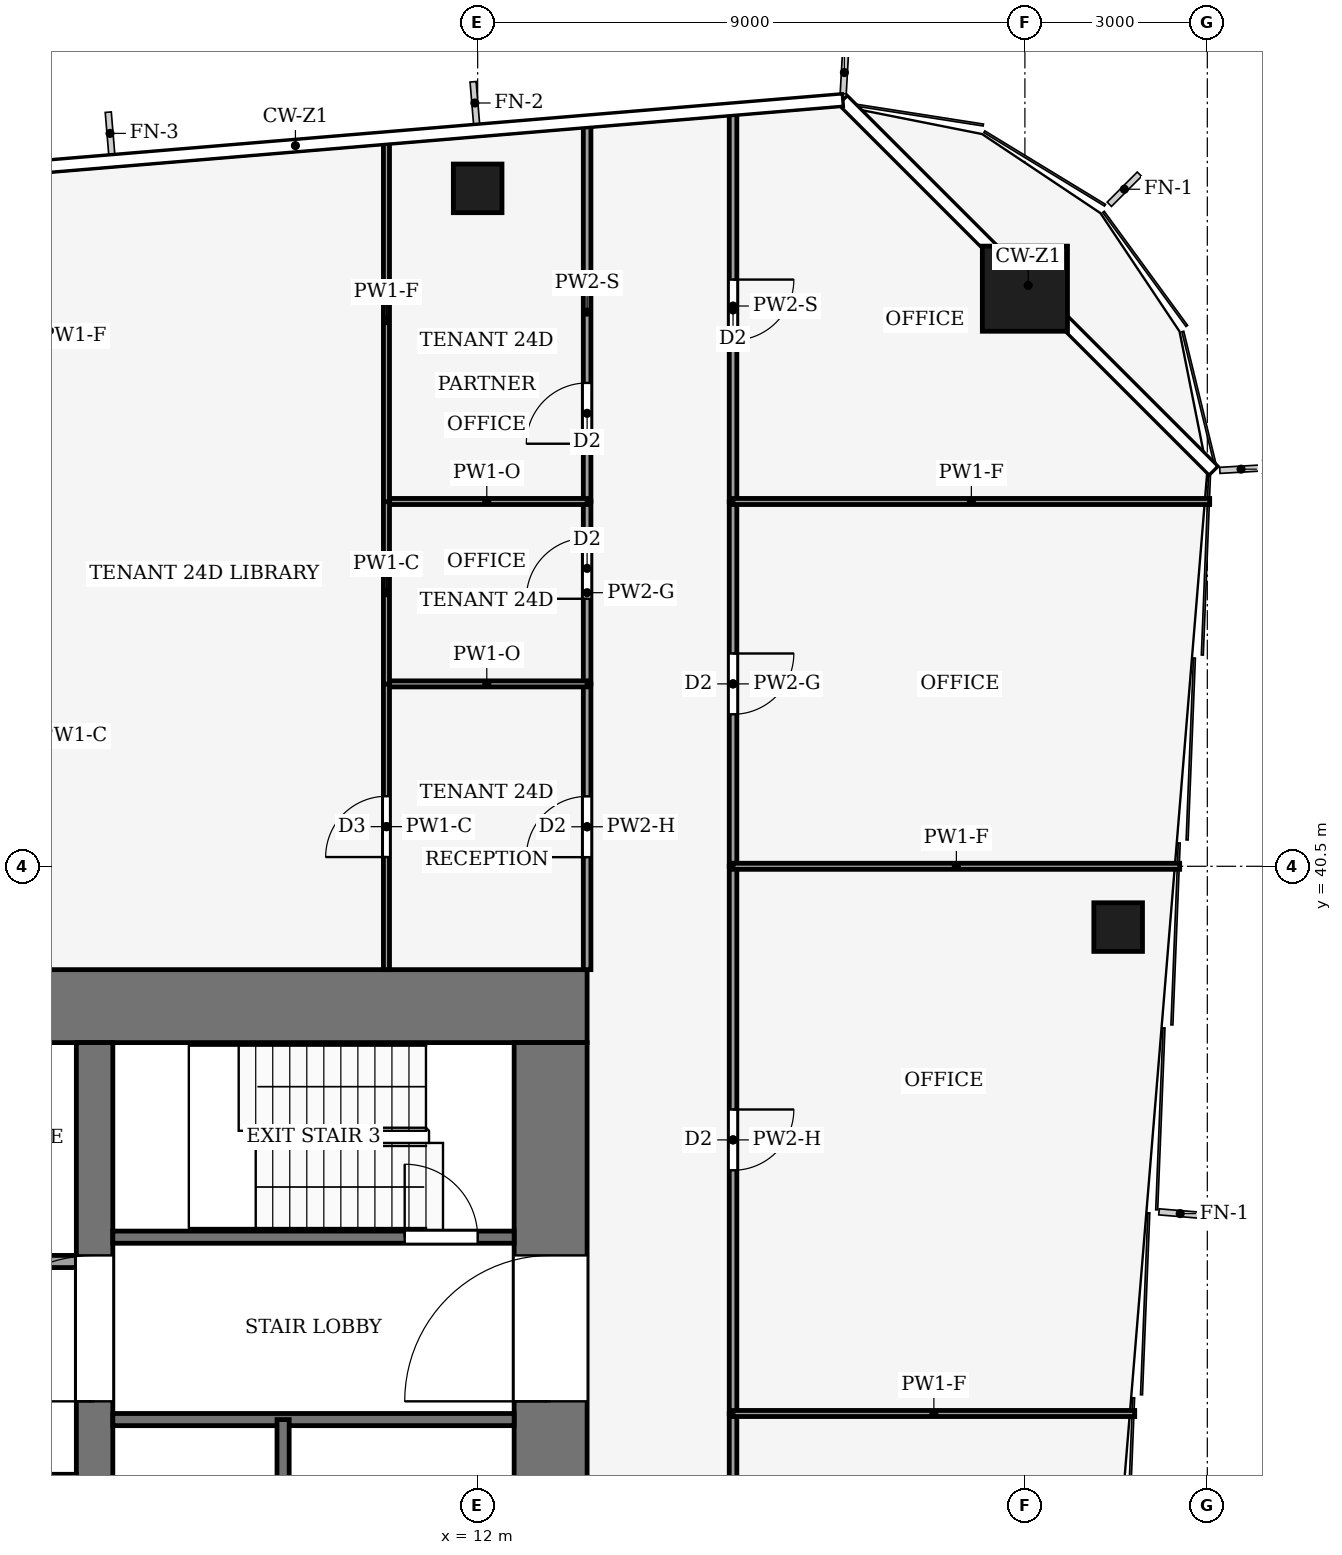
"""IFC4 building model, lengths in metres.
Left out: names, types, materials, properties, quantities, classifications, styles, units other than length and angle.
Written with IfcOpenShell. Run it as: python <this file> out.ifc"""

import sys

from ifc_helpers import new_model, si_unit, direction, frame, frame_2d, origin, origin_2d, place, context, subcontext, project, spatial, rectangle, hollow_rectangle, extrude, element, fill, save


model = new_model("IFC4")
c1 = context("Model", 3, precision=1e-05, world=origin(), true_north=direction((0.0, 1.0)))
c2 = subcontext(c1, "Body", "Model", "MODEL_VIEW")
j1 = project(units=[si_unit("LENGTHUNIT", "METRE"), si_unit("PLANEANGLEUNIT", "RADIAN")], contexts=[c1])
p1 = place(None, origin())
s1 = spatial("IfcSite", under=j1, at=p1, CompositionType="ELEMENT")
p2 = place(p1, origin())
s2 = spatial("IfcBuilding", under=s1, at=p2, CompositionType="ELEMENT")
p3 = place(p2, frame((0.0, 0.0, 106.0)))
s3 = spatial("IfcBuildingStorey", under=s2, at=p3, CompositionType="ELEMENT", Elevation=106.0)
p4 = place(p3, frame((-13.8, 38.2, -0.13), z_axis=(0.0, 0.0, 1.0), x_axis=(1.0, 0.0, 0.0)))
e1 = element("IfcWall", 1, at=p4, inside=s3, PredefinedType="SHEAR", context=c2, shape_type="SweptSolid", body=[
    extrude(rectangle(XDim=27.6, YDim=1.2, at=frame_2d((13.8, 0.0))), origin(), (0.0, 0.0, 1.0), 4.0),
])
p5 = place(p3, frame((13.2, 18.4, -0.13), z_axis=(0.0, 0.0, 1.0), x_axis=(0.0, 1.0, 0.0)))
e2 = element("IfcWall", 2, at=p5, inside=s3, PredefinedType="SHEAR", context=c2, shape_type="SweptSolid", body=[
    extrude(rectangle(XDim=19.2, YDim=1.2, at=frame_2d((9.6, 0.0))), origin(), (0.0, 0.0, 1.0), 4.0),
])
p6 = place(p5, frame((2.8, 0.0, 0.13)))
e3 = element("IfcOpeningElement", 3, at=p6, cuts=e2, PredefinedType="OPENING", context=c2, shape_type="SweptSolid", body=[
    extrude(rectangle(XDim=2.4, YDim=2.4, at=frame_2d((1.2, 1.2))), frame((0.0, 0.61, 0.0), z_axis=(0.0, -1.0, 0.0), x_axis=(1.0, 0.0, 0.0)), (0.0, 0.0, 1.0), 1.22),
])
p7 = place(p5, frame((13.3, 0.0, 0.13)))
e4 = element("IfcOpeningElement", 4, at=p7, cuts=e2, PredefinedType="OPENING", context=c2, shape_type="SweptSolid", body=[
    extrude(rectangle(XDim=2.4, YDim=2.4, at=frame_2d((1.2, 1.2))), frame((0.0, 0.61, 0.0), z_axis=(0.0, -1.0, 0.0), x_axis=(1.0, 0.0, 0.0)), (0.0, 0.0, 1.0), 1.22),
])
p8 = place(p3, frame((5.7, 18.4, -0.13), z_axis=(0.0, 0.0, 1.0), x_axis=(0.0, 1.0, 0.0)))
e5 = element("IfcWall", 5, at=p8, inside=s3, PredefinedType="SHEAR", context=c2, shape_type="SweptSolid", body=[
    extrude(rectangle(XDim=19.2, YDim=0.6, at=frame_2d((9.6, 0.0))), origin(), (0.0, 0.0, 1.0), 4.0),
])
p9 = place(p8, frame((8.35, 0.0, 0.13)))
e6 = element("IfcOpeningElement", 6, at=p9, cuts=e5, PredefinedType="OPENING", context=c2, shape_type="SweptSolid", body=[
    extrude(rectangle(XDim=0.9, YDim=2.1, at=frame_2d((0.45, 1.05))), frame((0.0, 0.31, 0.0), z_axis=(0.0, -1.0, 0.0), x_axis=(1.0, 0.0, 0.0)), (0.0, 0.0, 1.0), 0.62),
])
p10 = place(p8, frame((13.3, 0.0, 0.13)))
e7 = element("IfcOpeningElement", 7, at=p10, cuts=e5, PredefinedType="OPENING", context=c2, shape_type="SweptSolid", body=[
    extrude(rectangle(XDim=2.4, YDim=2.4, at=frame_2d((1.2, 1.2))), frame((0.0, 0.31, 0.0), z_axis=(0.0, -1.0, 0.0), x_axis=(1.0, 0.0, 0.0)), (0.0, 0.0, 1.0), 0.62),
])
p11 = place(p3, frame((21.0, 50.0, 0.0), z_axis=(0.0, 0.0, 1.0), x_axis=(1.0, 0.0, 0.0)))
e8 = element("IfcColumn", 8, at=p11, inside=s3, PredefinedType="COLUMN", context=c2, shape_type="SweptSolid", body=[
    extrude(hollow_rectangle(XDim=1.4, YDim=1.4, WallThickness=0.08, at=origin_2d()), origin(), (0.0, 0.0, 1.0), 4.0),
])
for number, where, z_axis, x_axis in (
    (9, (12.0, 51.65, 0.0), (0.0, 0.0, 1.0), (1.0, 0.0, 0.0)),
    (10, (22.534, 39.5, 0.0), (0.0, 0.0, 1.0), (1.0, 0.0, 0.0)),
):
    element("IfcColumn", number, at=place(p3, frame(where, z_axis=z_axis, x_axis=x_axis)), inside=s3, PredefinedType="COLUMN", context=c2, shape_type="SweptSolid", body=[
        extrude(hollow_rectangle(XDim=0.8, YDim=0.8, WallThickness=0.04, at=origin_2d()), origin(), (0.0, 0.0, 1.0), 4.0),
    ])
p12 = place(p3, frame((6.0, 31.4, 0.0), z_axis=(0.0, 0.0, 1.0), x_axis=(1.0, 0.0, 0.0)))
e11 = element("IfcWall", 11, at=p12, inside=s3, PredefinedType="PARTITIONING", context=c2, shape_type="SweptSolid", body=[
    extrude(rectangle(XDim=6.6, YDim=0.2, at=frame_2d((3.3, 0.0))), origin(), (0.0, 0.0, 1.0), 3.87),
])
p13 = place(p3, frame((-5.4, 34.0, 0.0), z_axis=(0.0, 0.0, 1.0), x_axis=(1.0, 0.0, 0.0)))
e12 = element("IfcWall", 12, at=p13, inside=s3, PredefinedType="PARTITIONING", context=c2, shape_type="SweptSolid", body=[
    extrude(rectangle(XDim=10.8, YDim=0.2, at=frame_2d((5.4, 0.0))), origin(), (0.0, 0.0, 1.0), 3.87),
])
p14 = place(p13, frame((6.15, 0.0, 0.0)))
e13 = element("IfcOpeningElement", 13, at=p14, cuts=e12, PredefinedType="OPENING", context=c2, shape_type="SweptSolid", body=[
    extrude(rectangle(XDim=1.2, YDim=2.2, at=frame_2d((0.6, 1.1))), frame((0.0, 0.11, 0.0), z_axis=(0.0, -1.0, 0.0), x_axis=(1.0, 0.0, 0.0)), (0.0, 0.0, 1.0), 0.22),
])
p15 = place(p13, frame((8.95, 0.0, 0.0)))
e14 = element("IfcOpeningElement", 14, at=p15, cuts=e12, PredefinedType="OPENING", context=c2, shape_type="SweptSolid", body=[
    extrude(rectangle(XDim=1.0, YDim=2.1, at=frame_2d((0.5, 1.05))), frame((0.0, 0.11, 0.0), z_axis=(0.0, -1.0, 0.0), x_axis=(1.0, 0.0, 0.0)), (0.0, 0.0, 1.0), 0.22),
])
p16 = place(p3, frame((6.0, 34.4, 0.0), z_axis=(0.0, 0.0, 1.0), x_axis=(1.0, 0.0, 0.0)))
e15 = element("IfcWall", 15, at=p16, inside=s3, PredefinedType="PARTITIONING", context=c2, shape_type="SweptSolid", body=[
    extrude(rectangle(XDim=6.6, YDim=0.2, at=frame_2d((3.3, 0.0))), origin(), (0.0, 0.0, 1.0), 3.87),
])
p17 = place(p16, frame((4.8, 0.0, 0.0)))
e16 = element("IfcOpeningElement", 16, at=p17, cuts=e15, PredefinedType="OPENING", context=c2, shape_type="SweptSolid", body=[
    extrude(rectangle(XDim=1.2, YDim=2.2, at=frame_2d((0.6, 1.1))), frame((0.0, 0.11, 0.0), z_axis=(0.0, -1.0, 0.0), x_axis=(1.0, 0.0, 0.0)), (0.0, 0.0, 1.0), 0.22),
])
p18 = place(p3, frame((8.8, 24.0, 0.0), z_axis=(0.0, 0.0, 1.0), x_axis=(0.0, 1.0, 0.0)))
e17 = element("IfcWall", 17, at=p18, inside=s3, PredefinedType="PARTITIONING", context=c2, shape_type="SweptSolid", body=[
    extrude(rectangle(XDim=7.4, YDim=0.2, at=frame_2d((3.7, 0.0))), origin(), (0.0, 0.0, 1.0), 3.87),
])
p19 = place(p3, frame((16.2, 31.5, 0.0), z_axis=(0.0, 0.0, 1.0), x_axis=(0.0, -1.0, 0.0)))
e18 = element("IfcWall", 18, at=p19, inside=s3, PredefinedType="PARTITIONING", context=c2, shape_type="SweptSolid", body=[
    extrude(rectangle(XDim=9.0, YDim=0.125, at=frame_2d((4.5, 0.0))), origin(), (0.0, 0.0, 1.0), 3.48),
])
p20 = place(p19, frame((4.0, 0.0, 0.0)))
e19 = element("IfcOpeningElement", 19, at=p20, cuts=e18, PredefinedType="OPENING", context=c2, shape_type="SweptSolid", body=[
    extrude(rectangle(XDim=1.0, YDim=2.1, at=frame_2d((0.5, 1.05))), frame((0.0, 0.073, 0.0), z_axis=(0.0, -1.0, 0.0), x_axis=(1.0, 0.0, 0.0)), (0.0, 0.0, 1.0), 0.145),
])
p21 = place(p3, frame((16.2, 40.5, 0.0), z_axis=(0.0, 0.0, 1.0), x_axis=(0.0, -1.0, 0.0)))
e20 = element("IfcWall", 20, at=p21, inside=s3, PredefinedType="PARTITIONING", context=c2, shape_type="SweptSolid", body=[
    extrude(rectangle(XDim=9.0, YDim=0.125, at=frame_2d((4.5, 0.0))), origin(), (0.0, 0.0, 1.0), 3.14),
])
p22 = place(p21, frame((4.0, 0.0, 0.0)))
e21 = element("IfcOpeningElement", 21, at=p22, cuts=e20, PredefinedType="OPENING", context=c2, shape_type="SweptSolid", body=[
    extrude(rectangle(XDim=1.0, YDim=2.1, at=frame_2d((0.5, 1.05))), frame((0.0, 0.073, 0.0), z_axis=(0.0, -1.0, 0.0), x_axis=(1.0, 0.0, 0.0)), (0.0, 0.0, 1.0), 0.145),
])
p23 = place(p3, frame((16.2, 46.5, 0.0), z_axis=(0.0, 0.0, 1.0), x_axis=(0.0, -1.0, 0.0)))
e22 = element("IfcWall", 22, at=p23, inside=s3, PredefinedType="PARTITIONING", context=c2, shape_type="SweptSolid", body=[
    extrude(rectangle(XDim=6.0, YDim=0.125, at=frame_2d((3.0, 0.0))), origin(), (0.0, 0.0, 1.0), 3.87),
])
p24 = place(p23, frame((2.5, 0.0, 0.0)))
e23 = element("IfcOpeningElement", 23, at=p24, cuts=e22, PredefinedType="OPENING", context=c2, shape_type="SweptSolid", body=[
    extrude(rectangle(XDim=1.0, YDim=2.1, at=frame_2d((0.5, 1.05))), frame((0.0, 0.073, 0.0), z_axis=(0.0, -1.0, 0.0), x_axis=(1.0, 0.0, 0.0)), (0.0, 0.0, 1.0), 0.145),
])
p25 = place(p3, frame((16.2, 52.93, 0.0), z_axis=(0.0, 0.0, 1.0), x_axis=(0.0, -1.0, 0.0)))
e24 = element("IfcWall", 24, at=p25, inside=s3, PredefinedType="PARTITIONING", context=c2, shape_type="SweptSolid", body=[
    extrude(rectangle(XDim=6.43, YDim=0.125, at=frame_2d((3.215, 0.0))), origin(), (0.0, 0.0, 1.0), 3.04),
])
p26 = place(p25, frame((2.78, 0.0, 0.0)))
e25 = element("IfcOpeningElement", 25, at=p26, cuts=e24, PredefinedType="OPENING", context=c2, shape_type="SweptSolid", body=[
    extrude(rectangle(XDim=1.0, YDim=2.1, at=frame_2d((0.5, 1.05))), frame((0.0, 0.073, 0.0), z_axis=(0.0, -1.0, 0.0), x_axis=(1.0, 0.0, 0.0)), (0.0, 0.0, 1.0), 0.145),
])
p27 = place(p3, frame((13.8, 38.8, 0.0), z_axis=(0.0, 0.0, 1.0), x_axis=(0.0, 1.0, 0.0)))
e26 = element("IfcWall", 26, at=p27, inside=s3, PredefinedType="PARTITIONING", context=c2, shape_type="SweptSolid", body=[
    extrude(rectangle(XDim=4.7, YDim=0.125, at=frame_2d((2.35, 0.0))), origin(), (0.0, 0.0, 1.0), 3.14),
])
p28 = place(p27, frame((1.85, 0.0, 0.0)))
e27 = element("IfcOpeningElement", 27, at=p28, cuts=e26, PredefinedType="OPENING", context=c2, shape_type="SweptSolid", body=[
    extrude(rectangle(XDim=1.0, YDim=2.1, at=frame_2d((0.5, 1.05))), frame((0.0, 0.073, 0.0), z_axis=(0.0, -1.0, 0.0), x_axis=(1.0, 0.0, 0.0)), (0.0, 0.0, 1.0), 0.145),
])
p29 = place(p3, frame((13.8, 43.5, 0.0), z_axis=(0.0, 0.0, 1.0), x_axis=(0.0, 1.0, 0.0)))
e28 = element("IfcWall", 28, at=p29, inside=s3, PredefinedType="PARTITIONING", context=c2, shape_type="SweptSolid", body=[
    extrude(rectangle(XDim=3.0, YDim=0.125, at=frame_2d((1.5, 0.0))), origin(), (0.0, 0.0, 1.0), 3.87),
])
p30 = place(p29, frame((1.4, 0.0, 0.0)))
e29 = element("IfcOpeningElement", 29, at=p30, cuts=e28, PredefinedType="OPENING", context=c2, shape_type="SweptSolid", body=[
    extrude(rectangle(XDim=1.0, YDim=2.1, at=frame_2d((0.5, 1.05))), frame((0.0, 0.073, 0.0), z_axis=(0.0, -1.0, 0.0), x_axis=(1.0, 0.0, 0.0)), (0.0, 0.0, 1.0), 0.145),
])
p31 = place(p3, frame((13.8, 46.5, 0.0), z_axis=(0.0, 0.0, 1.0), x_axis=(0.0, 1.0, 0.0)))
e30 = element("IfcWall", 30, at=p31, inside=s3, PredefinedType="PARTITIONING", context=c2, shape_type="SweptSolid", body=[
    extrude(rectangle(XDim=6.23, YDim=0.125, at=frame_2d((3.115, 0.0))), origin(), (0.0, 0.0, 1.0), 3.04),
])
p32 = place(p31, frame((0.95, 0.0, 0.0)))
e31 = element("IfcOpeningElement", 31, at=p32, cuts=e30, PredefinedType="OPENING", context=c2, shape_type="SweptSolid", body=[
    extrude(rectangle(XDim=1.0, YDim=2.1, at=frame_2d((0.5, 1.05))), frame((0.0, 0.073, 0.0), z_axis=(0.0, -1.0, 0.0), x_axis=(1.0, 0.0, 0.0)), (0.0, 0.0, 1.0), 0.145),
])
p33 = place(p3, frame((22.806, 31.5, 0.0), z_axis=(0.0, 0.0, 1.0), x_axis=(-1.0, 0.0, 0.0)))
e32 = element("IfcWall", 32, at=p33, inside=s3, PredefinedType="PARTITIONING", context=c2, shape_type="SweptSolid", body=[
    extrude(rectangle(XDim=6.606, YDim=0.1, at=frame_2d((3.303, 0.0))), origin(), (0.0, 0.0, 1.0), 3.04),
])
p34 = place(p3, frame((23.546, 40.5, 0.0), z_axis=(0.0, 0.0, 1.0), x_axis=(-1.0, 0.0, 0.0)))
e33 = element("IfcWall", 33, at=p34, inside=s3, PredefinedType="PARTITIONING", context=c2, shape_type="SweptSolid", body=[
    extrude(rectangle(XDim=7.346, YDim=0.1, at=frame_2d((3.673, 0.0))), origin(), (0.0, 0.0, 1.0), 3.04),
])
p35 = place(p3, frame((24.039, 46.5, 0.0), z_axis=(0.0, 0.0, 1.0), x_axis=(-1.0, 0.0, 0.0)))
e34 = element("IfcWall", 34, at=p35, inside=s3, PredefinedType="PARTITIONING", context=c2, shape_type="SweptSolid", body=[
    extrude(rectangle(XDim=7.839, YDim=0.1, at=frame_2d((3.919, 0.0))), origin(), (0.0, 0.0, 1.0), 3.04),
])
p36 = place(p3, frame((13.8, 43.5, 0.0), z_axis=(0.0, 0.0, 1.0), x_axis=(-1.0, 0.0, 0.0)))
e35 = element("IfcWall", 35, at=p36, inside=s3, PredefinedType="PARTITIONING", context=c2, shape_type="SweptSolid", body=[
    extrude(rectangle(XDim=3.3, YDim=0.1, at=frame_2d((1.65, 0.0))), origin(), (0.0, 0.0, 1.0), 3.39),
])
p37 = place(p3, frame((10.5, 38.8, 0.0), z_axis=(0.0, 0.0, 1.0), x_axis=(0.0, 1.0, 0.0)))
e36 = element("IfcWall", 36, at=p37, inside=s3, PredefinedType="PARTITIONING", context=c2, shape_type="SweptSolid", body=[
    extrude(rectangle(XDim=4.704, YDim=0.1, at=frame_2d((2.352, 0.0))), origin(), (0.0, 0.0, 1.0), 3.87),
])
p38 = place(p37, frame((1.852, 0.0, 0.0)))
e37 = element("IfcOpeningElement", 37, at=p38, cuts=e36, PredefinedType="OPENING", context=c2, shape_type="SweptSolid", body=[
    extrude(rectangle(XDim=1.0, YDim=2.1, at=frame_2d((0.5, 1.05))), frame((0.0, 0.06, 0.0), z_axis=(0.0, -1.0, 0.0), x_axis=(1.0, 0.0, 0.0)), (0.0, 0.0, 1.0), 0.12),
])
p39 = place(p3, frame((13.8, 46.5, 0.0), z_axis=(0.0, 0.0, 1.0), x_axis=(-1.0, 0.0, 0.0)))
e38 = element("IfcWall", 38, at=p39, inside=s3, PredefinedType="PARTITIONING", context=c2, shape_type="SweptSolid", body=[
    extrude(rectangle(XDim=3.3, YDim=0.1, at=frame_2d((1.65, 0.0))), origin(), (0.0, 0.0, 1.0), 3.39),
])
p40 = place(p3, frame((10.5, 46.504, 0.0), z_axis=(0.0, 0.0, 1.0), x_axis=(0.0, -1.0, 0.0)))
e39 = element("IfcWall", 39, at=p40, inside=s3, PredefinedType="PARTITIONING", context=c2, shape_type="SweptSolid", body=[
    extrude(rectangle(XDim=3.008, YDim=0.1, at=frame_2d((1.504, 0.0))), origin(), (0.0, 0.0, 1.0), 3.87),
])
p41 = place(p3, frame((10.5, 52.455, 0.0), z_axis=(0.0, 0.0, 1.0), x_axis=(0.0, -1.0, 0.0)))
e40 = element("IfcWall", 40, at=p41, inside=s3, PredefinedType="PARTITIONING", context=c2, shape_type="SweptSolid", body=[
    extrude(rectangle(XDim=5.959, YDim=0.1, at=frame_2d((2.979, 0.0))), origin(), (0.0, 0.0, 1.0), 3.04),
])
p42 = place(p17, origin())
e41 = element("IfcDoor", 41, at=p42, inside=s3, OperationType="SINGLE_SWING_RIGHT", PredefinedType="DOOR", context=c2, shape_type="SweptSolid", body=[
    extrude(rectangle(XDim=1.2, YDim=2.2, at=frame_2d((0.6, 1.1))), frame((0.0, 0.025, 0.0), z_axis=(0.0, -1.0, 0.0), x_axis=(1.0, 0.0, 0.0)), (0.0, 0.0, 1.0), 0.05),
])
fill(e16, e41)
p43 = place(p10, origin())
e42 = element("IfcDoor", 42, at=p43, inside=s3, OperationType="DOUBLE_DOOR_SINGLE_SWING", PredefinedType="DOOR", context=c2, shape_type="SweptSolid", body=[
    extrude(rectangle(XDim=2.4, YDim=2.4, at=frame_2d((1.2, 1.2))), frame((0.0, 0.025, 0.0), z_axis=(0.0, -1.0, 0.0), x_axis=(1.0, 0.0, 0.0)), (0.0, 0.0, 1.0), 0.05),
])
fill(e7, e42)
p44 = place(p7, origin())
e43 = element("IfcDoor", 43, at=p44, inside=s3, OperationType="DOUBLE_DOOR_SINGLE_SWING", PredefinedType="DOOR", context=c2, shape_type="SweptSolid", body=[
    extrude(rectangle(XDim=2.4, YDim=2.4, at=frame_2d((1.2, 1.2))), frame((0.0, 0.025, 0.0), z_axis=(0.0, -1.0, 0.0), x_axis=(1.0, 0.0, 0.0)), (0.0, 0.0, 1.0), 0.05),
])
fill(e4, e43)
p45 = place(p22, origin())
e44 = element("IfcDoor", 44, at=p45, inside=s3, OperationType="SINGLE_SWING_LEFT", PredefinedType="DOOR", context=c2, shape_type="SweptSolid", body=[
    extrude(rectangle(XDim=1.0, YDim=2.1, at=frame_2d((0.5, 1.05))), frame((0.0, 0.025, 0.0), z_axis=(0.0, -1.0, 0.0), x_axis=(1.0, 0.0, 0.0)), (0.0, 0.0, 1.0), 0.05),
])
fill(e21, e44)
p46 = place(p24, origin())
e45 = element("IfcDoor", 45, at=p46, inside=s3, OperationType="SINGLE_SWING_RIGHT", PredefinedType="DOOR", context=c2, shape_type="SweptSolid", body=[
    extrude(rectangle(XDim=1.0, YDim=2.1, at=frame_2d((0.5, 1.05))), frame((0.0, 0.025, 0.0), z_axis=(0.0, -1.0, 0.0), x_axis=(1.0, 0.0, 0.0)), (0.0, 0.0, 1.0), 0.05),
])
fill(e23, e45)
p47 = place(p26, origin())
e46 = element("IfcDoor", 46, at=p47, inside=s3, OperationType="SINGLE_SWING_RIGHT", PredefinedType="DOOR", context=c2, shape_type="SweptSolid", body=[
    extrude(rectangle(XDim=1.0, YDim=2.1, at=frame_2d((0.5, 1.05))), frame((0.0, 0.025, 0.0), z_axis=(0.0, -1.0, 0.0), x_axis=(1.0, 0.0, 0.0)), (0.0, 0.0, 1.0), 0.05),
])
fill(e25, e46)
p48 = place(p28, origin())
e47 = element("IfcDoor", 47, at=p48, inside=s3, OperationType="SINGLE_SWING_LEFT", PredefinedType="DOOR", context=c2, shape_type="SweptSolid", body=[
    extrude(rectangle(XDim=1.0, YDim=2.1, at=frame_2d((0.5, 1.05))), frame((0.0, 0.025, 0.0), z_axis=(0.0, -1.0, 0.0), x_axis=(1.0, 0.0, 0.0)), (0.0, 0.0, 1.0), 0.05),
])
fill(e27, e47)
p49 = place(p30, origin())
e48 = element("IfcDoor", 48, at=p49, inside=s3, OperationType="SINGLE_SWING_RIGHT", PredefinedType="DOOR", context=c2, shape_type="SweptSolid", body=[
    extrude(rectangle(XDim=1.0, YDim=2.1, at=frame_2d((0.5, 1.05))), frame((0.0, 0.025, 0.0), z_axis=(0.0, -1.0, 0.0), x_axis=(1.0, 0.0, 0.0)), (0.0, 0.0, 1.0), 0.05),
])
fill(e29, e48)
p50 = place(p32, origin())
e49 = element("IfcDoor", 49, at=p50, inside=s3, OperationType="SINGLE_SWING_LEFT", PredefinedType="DOOR", context=c2, shape_type="SweptSolid", body=[
    extrude(rectangle(XDim=1.0, YDim=2.1, at=frame_2d((0.5, 1.05))), frame((0.0, 0.025, 0.0), z_axis=(0.0, -1.0, 0.0), x_axis=(1.0, 0.0, 0.0)), (0.0, 0.0, 1.0), 0.05),
])
fill(e31, e49)
p51 = place(p38, origin())
e50 = element("IfcDoor", 50, at=p51, inside=s3, OperationType="SINGLE_SWING_RIGHT", PredefinedType="DOOR", context=c2, shape_type="SweptSolid", body=[
    extrude(rectangle(XDim=1.0, YDim=2.1, at=frame_2d((0.5, 1.05))), frame((0.0, 0.025, 0.0), z_axis=(0.0, -1.0, 0.0), x_axis=(1.0, 0.0, 0.0)), (0.0, 0.0, 1.0), 0.05),
])
fill(e37, e50)
save(model, sys.argv[1])
